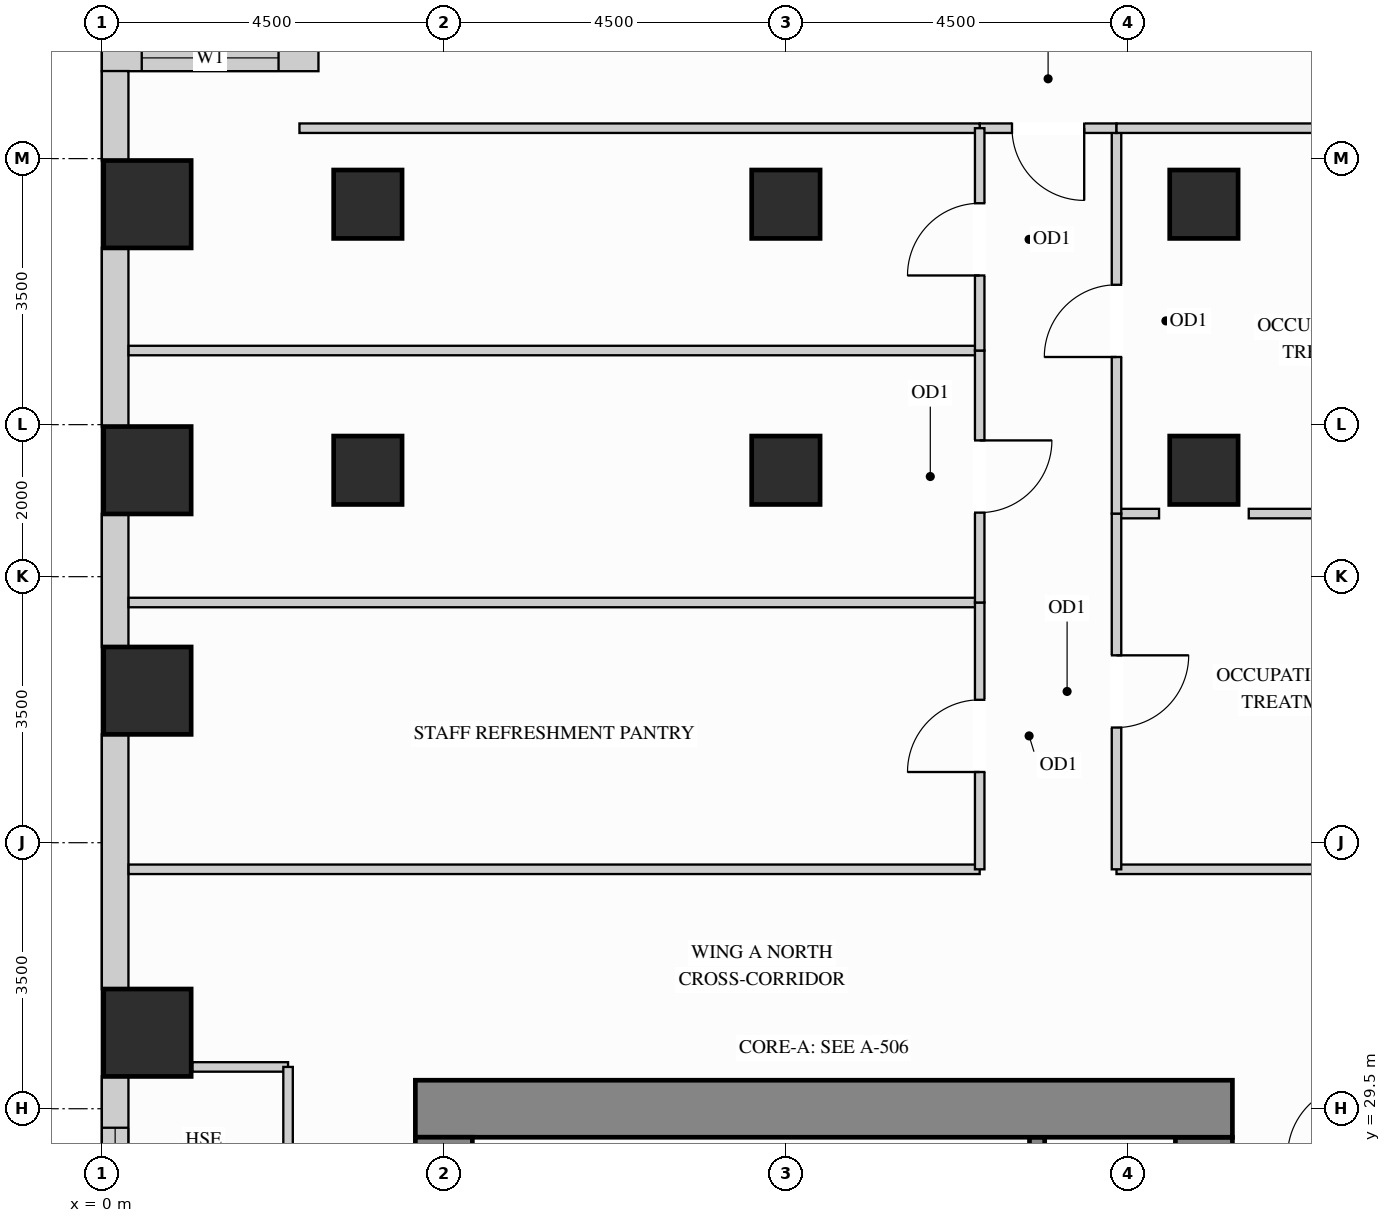
"""IFC4 building model, lengths in metres.
Left out: names, types, materials, properties, quantities, classifications, styles, units other than length and angle.
Written with IfcOpenShell. Run it as: python <this file> out.ifc"""

import sys

from ifc_helpers import new_model, si_unit, direction, frame, frame_2d, origin, origin_2d, place, context, subcontext, project, spatial, rectangle, extrude, source, transform, mapped, element, fill, save


model = new_model("IFC4")
c1 = context("Model", 3, precision=1e-05, world=origin(), true_north=direction((0.0, 1.0)))
c2 = subcontext(c1, "Body", "Model", "MODEL_VIEW")
j1 = project(units=[si_unit("LENGTHUNIT", "METRE"), si_unit("PLANEANGLEUNIT", "RADIAN")], contexts=[c1])
p1 = place(None, origin())
s1 = spatial("IfcSite", under=j1, at=p1, CompositionType="ELEMENT")
p2 = place(p1, origin())
s2 = spatial("IfcBuilding", under=s1, at=p2, CompositionType="ELEMENT")
p3 = place(p2, frame((0.0, 0.0, 117.0)))
s3 = spatial("IfcBuildingStorey", under=s2, at=p3, CompositionType="ELEMENT", Elevation=117.0)
m1 = source(origin(), c2, "Body", "SweptSolid", [
    extrude(rectangle(XDim=0.9, YDim=0.9, at=origin_2d()), origin(), (0.0, 0.0, 1.0), 3.38),
])
for number, where, z_axis, x_axis in (
    (1, (14.5, 37.9, 0.0), (0.0, 0.0, 1.0), (1.0, 0.0, 0.0)),
    (2, (14.5, 41.4, 0.0), (0.0, 0.0, 1.0), (1.0, 0.0, 0.0)),
    (3, (3.5, 37.9, 0.0), (0.0, 0.0, 1.0), (1.0, 0.0, 0.0)),
    (4, (3.5, 41.4, 0.0), (0.0, 0.0, 1.0), (1.0, 0.0, 0.0)),
    (5, (9.0, 37.9, 0.0), (0.0, 0.0, 1.0), (1.0, 0.0, 0.0)),
    (6, (9.0, 41.4, 0.0), (0.0, 0.0, 1.0), (1.0, 0.0, 0.0)),
):
    element("IfcColumn", number, at=place(p3, frame(where, z_axis=z_axis, x_axis=x_axis)), inside=s3, PredefinedType="COLUMN", context=c2, shape_type="MappedRepresentation", body=[
        mapped(m1, transform((0.0, 0.0, 0.0), x_axis=(1.0, 0.0, 0.0), y_axis=(0.0, 1.0, 0.0), z_axis=(0.0, 0.0, 1.0))),
    ])
m2 = source(origin(), c2, "Body", "SweptSolid", [
    extrude(rectangle(XDim=1.15, YDim=1.15, at=origin_2d()), origin(), (0.0, 0.0, 1.0), 3.38),
])
for number, where, z_axis, x_axis in (
    (7, (0.6, 30.5, 0.0), (0.0, 0.0, 1.0), (1.0, 0.0, 0.0)),
    (8, (0.6, 35.0, 0.0), (0.0, 0.0, 1.0), (1.0, 0.0, 0.0)),
    (9, (0.6, 37.9, 0.0), (0.0, 0.0, 1.0), (1.0, 0.0, 0.0)),
    (10, (0.6, 41.4, 0.0), (0.0, 0.0, 1.0), (1.0, 0.0, 0.0)),
):
    element("IfcColumn", number, at=place(p3, frame(where, z_axis=z_axis, x_axis=x_axis)), inside=s3, PredefinedType="COLUMN", context=c2, shape_type="MappedRepresentation", body=[
        mapped(m2, transform((0.0, 0.0, 0.0), x_axis=(1.0, 0.0, 0.0), y_axis=(0.0, 1.0, 0.0), z_axis=(0.0, 0.0, 1.0))),
    ])
m3 = source(origin(), c2, "Body", "SweptSolid", [
    extrude(rectangle(XDim=8.245, YDim=0.75, at=frame_2d((4.123, 0.0))), origin(), (0.0, 0.0, 1.0), 3.38),
])
p4 = place(p3, frame((14.5, 20.88, 0.0), z_axis=(0.0, 0.0, 1.0), x_axis=(0.0, 1.0, 0.0)))
e11 = element("IfcWall", 11, at=p4, inside=s3, PredefinedType="SHEAR", context=c2, shape_type="MappedRepresentation", body=[
    mapped(m3, transform((0.0, 0.0, 0.0), x_axis=(1.0, 0.0, 0.0), y_axis=(0.0, 1.0, 0.0), z_axis=(0.0, 0.0, 1.0))),
])
m4 = source(origin(), c2, "Body", "SweptSolid", [
    extrude(rectangle(XDim=10.75, YDim=0.75, at=frame_2d((5.375, 0.0))), origin(), (0.0, 0.0, 1.0), 3.38),
])
p5 = place(p3, frame((4.125, 29.5, 0.0), z_axis=(0.0, 0.0, 1.0), x_axis=(1.0, 0.0, 0.0)))
e12 = element("IfcWall", 12, at=p5, inside=s3, PredefinedType="SHEAR", context=c2, shape_type="MappedRepresentation", body=[
    mapped(m4, transform((0.0, 0.0, 0.0), x_axis=(1.0, 0.0, 0.0), y_axis=(0.0, 1.0, 0.0), z_axis=(0.0, 0.0, 1.0))),
])
m5 = source(origin(), c2, "Body", "SweptSolid", [
    extrude(rectangle(XDim=20.25, YDim=0.75, at=frame_2d((10.125, 0.0))), origin(), (0.0, 0.0, 1.0), 3.38),
])
p6 = place(p3, frame((4.5, 8.875, 0.0), z_axis=(0.0, 0.0, 1.0), x_axis=(0.0, 1.0, 0.0)))
e13 = element("IfcWall", 13, at=p6, inside=s3, PredefinedType="SHEAR", context=c2, shape_type="MappedRepresentation", body=[
    mapped(m5, transform((0.0, 0.0, 0.0), x_axis=(1.0, 0.0, 0.0), y_axis=(0.0, 1.0, 0.0), z_axis=(0.0, 0.0, 1.0))),
])
p7 = place(p3, frame((2.85, 43.325, 0.0), z_axis=(0.0, 0.0, 1.0), x_axis=(-1.0, 0.0, 0.0)))
e14 = element("IfcWall", 14, at=p7, inside=s3, PredefinedType="SOLIDWALL", context=c2, shape_type="SweptSolid", body=[
    extrude(rectangle(XDim=2.85, YDim=0.35, at=frame_2d((1.425, 0.0))), origin(), (0.0, 0.0, 1.0), 3.365),
])
p8 = place(p7, frame((0.525, 0.0, 0.78)))
e15 = element("IfcOpeningElement", 15, at=p8, cuts=e14, PredefinedType="OPENING", context=c2, shape_type="SweptSolid", body=[
    extrude(rectangle(XDim=1.8, YDim=2.1, at=frame_2d((0.9, 1.05))), frame((0.0, 0.185, 0.0), z_axis=(0.0, -1.0, 0.0), x_axis=(1.0, 0.0, 0.0)), (0.0, 0.0, 1.0), 0.37),
])
m6 = source(origin(), c2, "Body", "SweptSolid", [
    extrude(rectangle(XDim=1.179, YDim=0.35, at=frame_2d((0.59, 0.0))), origin(), (0.0, 0.0, 1.0), 3.365),
])
p9 = place(p3, frame((0.175, 43.152, 0.0), z_axis=(0.0, 0.0, 1.0), x_axis=(0.0, -1.0, 0.0)))
e16 = element("IfcWall", 16, at=p9, inside=s3, PredefinedType="SOLIDWALL", context=c2, shape_type="MappedRepresentation", body=[
    mapped(m6, transform((0.0, 0.0, 0.0), x_axis=(1.0, 0.0, 0.0), y_axis=(0.0, 1.0, 0.0), z_axis=(0.0, 0.0, 1.0))),
])
m7 = source(origin(), c2, "Body", "SweptSolid", [
    extrude(rectangle(XDim=2.354, YDim=0.35, at=frame_2d((1.177, 0.0))), origin(), (0.0, 0.0, 1.0), 3.365),
])
p10 = place(p3, frame((0.175, 40.827, 0.0), z_axis=(0.0, 0.0, 1.0), x_axis=(0.0, -1.0, 0.0)))
e17 = element("IfcWall", 17, at=p10, inside=s3, PredefinedType="SOLIDWALL", context=c2, shape_type="MappedRepresentation", body=[
    mapped(m7, transform((0.0, 0.0, 0.0), x_axis=(1.0, 0.0, 0.0), y_axis=(0.0, 1.0, 0.0), z_axis=(0.0, 0.0, 1.0))),
])
m8 = source(origin(), c2, "Body", "SweptSolid", [
    extrude(rectangle(XDim=1.754, YDim=0.35, at=frame_2d((0.877, 0.0))), origin(), (0.0, 0.0, 1.0), 3.365),
])
p11 = place(p3, frame((0.175, 37.327, 0.0), z_axis=(0.0, 0.0, 1.0), x_axis=(0.0, -1.0, 0.0)))
e18 = element("IfcWall", 18, at=p11, inside=s3, PredefinedType="SOLIDWALL", context=c2, shape_type="MappedRepresentation", body=[
    mapped(m8, transform((0.0, 0.0, 0.0), x_axis=(1.0, 0.0, 0.0), y_axis=(0.0, 1.0, 0.0), z_axis=(0.0, 0.0, 1.0))),
])
m9 = source(origin(), c2, "Body", "SweptSolid", [
    extrude(rectangle(XDim=3.354, YDim=0.35, at=frame_2d((1.677, 0.0))), origin(), (0.0, 0.0, 1.0), 3.365),
])
p12 = place(p3, frame((0.175, 34.427, 0.0), z_axis=(0.0, 0.0, 1.0), x_axis=(0.0, -1.0, 0.0)))
e19 = element("IfcWall", 19, at=p12, inside=s3, PredefinedType="SOLIDWALL", context=c2, shape_type="MappedRepresentation", body=[
    mapped(m9, transform((0.0, 0.0, 0.0), x_axis=(1.0, 0.0, 0.0), y_axis=(0.0, 1.0, 0.0), z_axis=(0.0, 0.0, 1.0))),
])
p13 = place(p3, frame((0.175, 29.927, 0.0), z_axis=(0.0, 0.0, 1.0), x_axis=(0.0, -1.0, 0.0)))
e20 = element("IfcWall", 20, at=p13, inside=s3, PredefinedType="SOLIDWALL", context=c2, shape_type="SweptSolid", body=[
    extrude(rectangle(XDim=2.554, YDim=0.35, at=frame_2d((1.277, 0.0))), origin(), (0.0, 0.0, 1.0), 3.365),
])
p14 = place(p13, frame((0.677, 0.0, 0.78)))
e21 = element("IfcOpeningElement", 21, at=p14, cuts=e20, PredefinedType="OPENING", context=c2, shape_type="SweptSolid", body=[
    extrude(rectangle(XDim=1.2, YDim=2.1, at=frame_2d((0.6, 1.05))), frame((0.0, 0.185, 0.0), z_axis=(0.0, -1.0, 0.0), x_axis=(1.0, 0.0, 0.0)), (0.0, 0.0, 1.0), 0.37),
])
m10 = source(origin(), c2, "Body", "SweptSolid", [
    extrude(rectangle(XDim=0.56, YDim=0.125, at=frame_2d((0.28, 0.0))), origin(), (0.0, 0.0, 1.0), 3.365),
])
p15 = place(p3, frame((13.35, 37.33, 0.0), z_axis=(0.0, 0.0, 1.0), x_axis=(1.0, 0.0, 0.0)))
e22 = element("IfcWall", 22, at=p15, inside=s3, PredefinedType="PARTITIONING", context=c2, shape_type="MappedRepresentation", body=[
    mapped(m10, transform((0.0, 0.0, 0.0), x_axis=(1.0, 0.0, 0.0), y_axis=(0.0, 1.0, 0.0), z_axis=(0.0, 0.0, 1.0))),
])
m11 = source(origin(), c2, "Body", "SweptSolid", [
    extrude(rectangle(XDim=3.32, YDim=0.125, at=frame_2d((1.66, 0.0))), origin(), (0.0, 0.0, 1.0), 3.365),
])
p16 = place(p3, frame((15.09, 37.33, 0.0), z_axis=(0.0, 0.0, 1.0), x_axis=(1.0, 0.0, 0.0)))
e23 = element("IfcWall", 23, at=p16, inside=s3, PredefinedType="PARTITIONING", context=c2, shape_type="MappedRepresentation", body=[
    mapped(m11, transform((0.0, 0.0, 0.0), x_axis=(1.0, 0.0, 0.0), y_axis=(0.0, 1.0, 0.0), z_axis=(0.0, 0.0, 1.0))),
])
m12 = source(origin(), c2, "Body", "SweptSolid", [
    extrude(rectangle(XDim=5.798, YDim=0.125, at=frame_2d((2.899, 0.0))), origin(), (0.0, 0.0, 1.0), 3.365),
])
p17 = place(p3, frame((13.35, 32.65, 0.0), z_axis=(0.0, 0.0, 1.0), x_axis=(1.0, 0.0, 0.0)))
e24 = element("IfcWall", 24, at=p17, inside=s3, PredefinedType="PARTITIONING", context=c2, shape_type="MappedRepresentation", body=[
    mapped(m12, transform((0.0, 0.0, 0.0), x_axis=(1.0, 0.0, 0.0), y_axis=(0.0, 1.0, 0.0), z_axis=(0.0, 0.0, 1.0))),
])
m13 = source(origin(), c2, "Body", "SweptSolid", [
    extrude(rectangle(XDim=11.198, YDim=0.125, at=frame_2d((5.599, 0.0))), origin(), (0.0, 0.0, 1.0), 3.365),
])
p18 = place(p3, frame((0.352, 32.65, 0.0), z_axis=(0.0, 0.0, 1.0), x_axis=(1.0, 0.0, 0.0)))
e25 = element("IfcWall", 25, at=p18, inside=s3, PredefinedType="PARTITIONING", context=c2, shape_type="MappedRepresentation", body=[
    mapped(m13, transform((0.0, 0.0, 0.0), x_axis=(1.0, 0.0, 0.0), y_axis=(0.0, 1.0, 0.0), z_axis=(0.0, 0.0, 1.0))),
])
m14 = source(origin(), c2, "Body", "SweptSolid", [
    extrude(rectangle(XDim=11.198, YDim=0.125, at=frame_2d((5.599, 0.0))), origin(), (0.0, 0.0, 1.0), 2.828),
])
for number, where, z_axis, x_axis in (
    (26, (0.352, 36.16, 0.0), (0.0, 0.0, 1.0), (1.0, 0.0, 0.0)),
    (27, (0.352, 39.475, 0.0), (0.0, 0.0, 1.0), (1.0, 0.0, 0.0)),
):
    element("IfcWall", number, at=place(p3, frame(where, z_axis=z_axis, x_axis=x_axis)), inside=s3, PredefinedType="PARTITIONING", context=c2, shape_type="MappedRepresentation", body=[
        mapped(m14, transform((0.0, 0.0, 0.0), x_axis=(1.0, 0.0, 0.0), y_axis=(0.0, 1.0, 0.0), z_axis=(0.0, 0.0, 1.0))),
    ])
m15 = source(origin(), c2, "Body", "SweptSolid", [
    extrude(rectangle(XDim=1.26, YDim=0.125, at=frame_2d((0.63, 0.0))), origin(), (0.0, 0.0, 1.0), 3.365),
])
p19 = place(p3, frame((1.19, 30.05, 0.0), z_axis=(0.0, 0.0, 1.0), x_axis=(1.0, 0.0, 0.0)))
e28 = element("IfcWall", 28, at=p19, inside=s3, PredefinedType="PARTITIONING", context=c2, shape_type="MappedRepresentation", body=[
    mapped(m15, transform((0.0, 0.0, 0.0), x_axis=(1.0, 0.0, 0.0), y_axis=(0.0, 1.0, 0.0), z_axis=(0.0, 0.0, 1.0))),
])
p20 = place(p3, frame((13.35, 32.65, 0.0), z_axis=(0.0, 0.0, 1.0), x_axis=(0.0, 1.0, 0.0)))
e29 = element("IfcWall", 29, at=p20, inside=s3, PredefinedType="PARTITIONING", context=c2, shape_type="SweptSolid", body=[
    extrude(rectangle(XDim=4.68, YDim=0.125, at=frame_2d((2.34, 0.0))), origin(), (0.0, 0.0, 1.0), 3.365),
])
p21 = place(p20, frame((1.865, 0.0, 0.0)))
e30 = element("IfcOpeningElement", 30, at=p21, cuts=e29, PredefinedType="OPENING", context=c2, shape_type="SweptSolid", body=[
    extrude(rectangle(XDim=0.95, YDim=2.15, at=frame_2d((0.475, 1.075))), frame((0.0, 0.073, 0.0), z_axis=(0.0, -1.0, 0.0), x_axis=(1.0, 0.0, 0.0)), (0.0, 0.0, 1.0), 0.145),
])
p22 = place(p3, frame((13.35, 37.33, 0.0), z_axis=(0.0, 0.0, 1.0), x_axis=(0.0, 1.0, 0.0)))
e31 = element("IfcWall", 31, at=p22, inside=s3, PredefinedType="PARTITIONING", context=c2, shape_type="SweptSolid", body=[
    extrude(rectangle(XDim=5.07, YDim=0.125, at=frame_2d((2.535, 0.0))), origin(), (0.0, 0.0, 1.0), 3.365),
])
p23 = place(p22, frame((2.06, 0.0, 0.0)))
e32 = element("IfcOpeningElement", 32, at=p23, cuts=e31, PredefinedType="OPENING", context=c2, shape_type="SweptSolid", body=[
    extrude(rectangle(XDim=0.95, YDim=2.15, at=frame_2d((0.475, 1.075))), frame((0.0, 0.073, 0.0), z_axis=(0.0, -1.0, 0.0), x_axis=(1.0, 0.0, 0.0)), (0.0, 0.0, 1.0), 0.145),
])
p24 = place(p3, frame((11.55, 42.4, 0.0), z_axis=(0.0, 0.0, 1.0), x_axis=(1.0, 0.0, 0.0)))
e33 = element("IfcWall", 33, at=p24, inside=s3, PredefinedType="PARTITIONING", context=c2, shape_type="SweptSolid", body=[
    extrude(rectangle(XDim=1.8, YDim=0.125, at=frame_2d((0.9, 0.0))), origin(), (0.0, 0.0, 1.0), 3.365),
])
p25 = place(p24, frame((0.425, 0.0, 0.0)))
e34 = element("IfcOpeningElement", 34, at=p25, cuts=e33, PredefinedType="OPENING", context=c2, shape_type="SweptSolid", body=[
    extrude(rectangle(XDim=0.95, YDim=2.15, at=frame_2d((0.475, 1.075))), frame((0.0, 0.073, 0.0), z_axis=(0.0, -1.0, 0.0), x_axis=(1.0, 0.0, 0.0)), (0.0, 0.0, 1.0), 0.145),
])
m16 = source(origin(), c2, "Body", "SweptSolid", [
    extrude(rectangle(XDim=3.55, YDim=0.125, at=frame_2d((1.775, 0.0))), origin(), (0.0, 0.0, 1.0), 3.365),
])
p26 = place(p3, frame((13.35, 42.4, 0.0), z_axis=(0.0, 0.0, 1.0), x_axis=(1.0, 0.0, 0.0)))
e35 = element("IfcWall", 35, at=p26, inside=s3, PredefinedType="PARTITIONING", context=c2, shape_type="MappedRepresentation", body=[
    mapped(m16, transform((0.0, 0.0, 0.0), x_axis=(1.0, 0.0, 0.0), y_axis=(0.0, 1.0, 0.0), z_axis=(0.0, 0.0, 1.0))),
])
m17 = source(origin(), c2, "Body", "SweptSolid", [
    extrude(rectangle(XDim=8.95, YDim=0.125, at=frame_2d((4.475, 0.0))), origin(), (0.0, 0.0, 1.0), 3.365),
])
p27 = place(p3, frame((2.6, 42.4, 0.0), z_axis=(0.0, 0.0, 1.0), x_axis=(1.0, 0.0, 0.0)))
e36 = element("IfcWall", 36, at=p27, inside=s3, PredefinedType="PARTITIONING", context=c2, shape_type="MappedRepresentation", body=[
    mapped(m17, transform((0.0, 0.0, 0.0), x_axis=(1.0, 0.0, 0.0), y_axis=(0.0, 1.0, 0.0), z_axis=(0.0, 0.0, 1.0))),
])
p28 = place(p3, frame((11.55, 32.65, 0.0), z_axis=(0.0, 0.0, 1.0), x_axis=(0.0, 1.0, 0.0)))
e37 = element("IfcWall", 37, at=p28, inside=s3, PredefinedType="PARTITIONING", context=c2, shape_type="SweptSolid", body=[
    extrude(rectangle(XDim=3.51, YDim=0.125, at=frame_2d((1.755, 0.0))), origin(), (0.0, 0.0, 1.0), 3.365),
])
p29 = place(p28, frame((1.28, 0.0, 0.0)))
e38 = element("IfcOpeningElement", 38, at=p29, cuts=e37, PredefinedType="OPENING", context=c2, shape_type="SweptSolid", body=[
    extrude(rectangle(XDim=0.95, YDim=2.15, at=frame_2d((0.475, 1.075))), frame((0.0, 0.073, 0.0), z_axis=(0.0, -1.0, 0.0), x_axis=(1.0, 0.0, 0.0)), (0.0, 0.0, 1.0), 0.145),
])
p30 = place(p3, frame((11.55, 36.16, 0.0), z_axis=(0.0, 0.0, 1.0), x_axis=(0.0, 1.0, 0.0)))
e39 = element("IfcWall", 39, at=p30, inside=s3, PredefinedType="PARTITIONING", context=c2, shape_type="SweptSolid", body=[
    extrude(rectangle(XDim=3.315, YDim=0.125, at=frame_2d((1.658, 0.0))), origin(), (0.0, 0.0, 1.0), 3.365),
])
p31 = place(p30, frame((1.183, 0.0, 0.0)))
e40 = element("IfcOpeningElement", 40, at=p31, cuts=e39, PredefinedType="OPENING", context=c2, shape_type="SweptSolid", body=[
    extrude(rectangle(XDim=0.95, YDim=2.15, at=frame_2d((0.475, 1.075))), frame((0.0, 0.073, 0.0), z_axis=(0.0, -1.0, 0.0), x_axis=(1.0, 0.0, 0.0)), (0.0, 0.0, 1.0), 0.145),
])
p32 = place(p3, frame((11.55, 39.475, 0.0), z_axis=(0.0, 0.0, 1.0), x_axis=(0.0, 1.0, 0.0)))
e41 = element("IfcWall", 41, at=p32, inside=s3, PredefinedType="PARTITIONING", context=c2, shape_type="SweptSolid", body=[
    extrude(rectangle(XDim=2.925, YDim=0.125, at=frame_2d((1.462, 0.0))), origin(), (0.0, 0.0, 1.0), 3.365),
])
p33 = place(p32, frame((0.988, 0.0, 0.0)))
e42 = element("IfcOpeningElement", 42, at=p33, cuts=e41, PredefinedType="OPENING", context=c2, shape_type="SweptSolid", body=[
    extrude(rectangle(XDim=0.95, YDim=2.15, at=frame_2d((0.475, 1.075))), frame((0.0, 0.073, 0.0), z_axis=(0.0, -1.0, 0.0), x_axis=(1.0, 0.0, 0.0)), (0.0, 0.0, 1.0), 0.145),
])
p34 = place(p3, frame((2.45, 22.6, 0.0), z_axis=(0.0, 0.0, 1.0), x_axis=(0.0, 1.0, 0.0)))
e43 = element("IfcWall", 43, at=p34, inside=s3, PredefinedType="PARTITIONING", context=c2, shape_type="SweptSolid", body=[
    extrude(rectangle(XDim=7.45, YDim=0.125, at=frame_2d((3.725, 0.0))), origin(), (0.0, 0.0, 1.0), 3.365),
])
p35 = place(p34, frame((3.25, 0.0, 0.0)))
e44 = element("IfcOpeningElement", 44, at=p35, cuts=e43, PredefinedType="OPENING", context=c2, shape_type="SweptSolid", body=[
    extrude(rectangle(XDim=0.95, YDim=2.15, at=frame_2d((0.475, 1.075))), frame((0.0, 0.073, 0.0), z_axis=(0.0, -1.0, 0.0), x_axis=(1.0, 0.0, 0.0)), (0.0, 0.0, 1.0), 0.145),
])
m18 = source(origin(), c2, "Body", "SweptSolid", [
    extrude(rectangle(XDim=3.678, YDim=0.2, at=frame_2d((1.839, 0.0))), origin(), (0.0, 0.0, 1.0), 3.38),
])
p36 = place(p3, frame((12.305, 25.445, 0.0), z_axis=(0.0, 0.0, 1.0), x_axis=(0.0, 1.0, 0.0)))
e45 = element("IfcWall", 45, at=p36, inside=s3, PredefinedType="SHEAR", context=c2, shape_type="MappedRepresentation", body=[
    mapped(m18, transform((0.0, 0.0, 0.0), x_axis=(1.0, 0.0, 0.0), y_axis=(0.0, 1.0, 0.0), z_axis=(0.0, 0.0, 1.0))),
])
m19 = source(origin(), c2, "Body", "SweptSolid", [
    extrude(rectangle(XDim=0.95, YDim=2.15, at=frame_2d((0.475, 1.075))), frame((0.0, 0.025, 0.0), z_axis=(0.0, -1.0, 0.0), x_axis=(1.0, 0.0, 0.0)), (0.0, 0.0, 1.0), 0.05),
])
p37 = place(p21, origin())
e46 = element("IfcDoor", 46, at=p37, inside=s3, OperationType="SINGLE_SWING_RIGHT", PredefinedType="DOOR", context=c2, shape_type="MappedRepresentation", body=[
    mapped(m19, transform((0.0, 0.0, 0.0), x_axis=(1.0, 0.0, 0.0), y_axis=(0.0, 1.0, 0.0), z_axis=(0.0, 0.0, 1.0))),
])
fill(e30, e46)
p38 = place(p23, origin())
e47 = element("IfcDoor", 47, at=p38, inside=s3, OperationType="SINGLE_SWING_LEFT", PredefinedType="DOOR", context=c2, shape_type="MappedRepresentation", body=[
    mapped(m19, transform((0.0, 0.0, 0.0), x_axis=(1.0, 0.0, 0.0), y_axis=(0.0, 1.0, 0.0), z_axis=(0.0, 0.0, 1.0))),
])
fill(e32, e47)
p39 = place(p25, origin())
e48 = element("IfcDoor", 48, at=p39, inside=s3, OperationType="SINGLE_SWING_RIGHT", PredefinedType="DOOR", context=c2, shape_type="MappedRepresentation", body=[
    mapped(m19, transform((0.0, 0.0, 0.0), x_axis=(1.0, 0.0, 0.0), y_axis=(0.0, 1.0, 0.0), z_axis=(0.0, 0.0, 1.0))),
])
fill(e34, e48)
p40 = place(p29, origin())
e49 = element("IfcDoor", 49, at=p40, inside=s3, OperationType="SINGLE_SWING_LEFT", PredefinedType="DOOR", context=c2, shape_type="MappedRepresentation", body=[
    mapped(m19, transform((0.0, 0.0, 0.0), x_axis=(1.0, 0.0, 0.0), y_axis=(0.0, 1.0, 0.0), z_axis=(0.0, 0.0, 1.0))),
])
fill(e38, e49)
p41 = place(p31, origin())
e50 = element("IfcDoor", 50, at=p41, inside=s3, OperationType="SINGLE_SWING_RIGHT", PredefinedType="DOOR", context=c2, shape_type="MappedRepresentation", body=[
    mapped(m19, transform((0.0, 0.0, 0.0), x_axis=(1.0, 0.0, 0.0), y_axis=(0.0, 1.0, 0.0), z_axis=(0.0, 0.0, 1.0))),
])
fill(e40, e50)
p42 = place(p33, origin())
e51 = element("IfcDoor", 51, at=p42, inside=s3, OperationType="SINGLE_SWING_LEFT", PredefinedType="DOOR", context=c2, shape_type="MappedRepresentation", body=[
    mapped(m19, transform((0.0, 0.0, 0.0), x_axis=(1.0, 0.0, 0.0), y_axis=(0.0, 1.0, 0.0), z_axis=(0.0, 0.0, 1.0))),
])
fill(e42, e51)
m20 = source(origin(), c2, "Body", "SweptSolid", [
    extrude(rectangle(XDim=1.8, YDim=2.1, at=frame_2d((0.9, 1.05))), frame((0.0, 0.03, 0.0), z_axis=(0.0, -1.0, 0.0), x_axis=(1.0, 0.0, 0.0)), (0.0, 0.0, 1.0), 0.06),
])
p43 = place(p8, origin())
e52 = element("IfcWindow", 52, at=p43, inside=s3, PartitioningType="SINGLE_PANEL", PredefinedType="WINDOW", context=c2, shape_type="MappedRepresentation", body=[
    mapped(m20, transform((0.0, 0.0, 0.0), x_axis=(1.0, 0.0, 0.0), y_axis=(0.0, 1.0, 0.0), z_axis=(0.0, 0.0, 1.0))),
])
fill(e15, e52)
m21 = source(origin(), c2, "Body", "SweptSolid", [
    extrude(rectangle(XDim=1.2, YDim=2.1, at=frame_2d((0.6, 1.05))), frame((0.0, 0.03, 0.0), z_axis=(0.0, -1.0, 0.0), x_axis=(1.0, 0.0, 0.0)), (0.0, 0.0, 1.0), 0.06),
])
p44 = place(p14, origin())
e53 = element("IfcWindow", 53, at=p44, inside=s3, PartitioningType="SINGLE_PANEL", PredefinedType="WINDOW", context=c2, shape_type="MappedRepresentation", body=[
    mapped(m21, transform((0.0, 0.0, 0.0), x_axis=(1.0, 0.0, 0.0), y_axis=(0.0, 1.0, 0.0), z_axis=(0.0, 0.0, 1.0))),
])
fill(e21, e53)
save(model, sys.argv[1])
